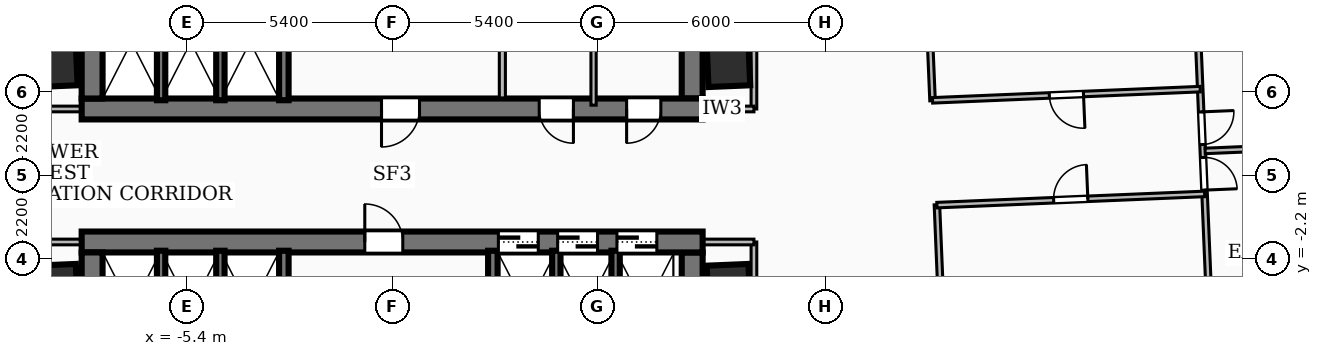
"""IFC4 building model, lengths in metres.
Left out: names, types, materials, properties, quantities, classifications, styles, units other than length and angle.
Written with IfcOpenShell. Run it as: python <this file> out.ifc"""

import sys

from ifc_helpers import new_model, si_unit, direction, frame, frame_2d, origin, origin_2d, place, context, subcontext, project, spatial, rectangle, extrude, element, fill, save


model = new_model("IFC4")
c1 = context("Model", 3, precision=1e-05, world=origin(), true_north=direction((0.0, 1.0)))
c2 = subcontext(c1, "Body", "Model", "MODEL_VIEW")
j1 = project(units=[si_unit("LENGTHUNIT", "METRE"), si_unit("PLANEANGLEUNIT", "RADIAN")], contexts=[c1])
p1 = place(None, origin())
s1 = spatial("IfcSite", under=j1, at=p1, CompositionType="ELEMENT")
p2 = place(p1, origin())
s2 = spatial("IfcBuilding", under=s1, at=p2, CompositionType="ELEMENT")
p3 = place(p2, frame((0.0, 0.0, 46.08)))
s3 = spatial("IfcBuildingStorey", under=s2, at=p3, CompositionType="ELEMENT", Elevation=46.08)
p4 = place(p3, frame((8.17, 1.75, 0.0), z_axis=(0.0, 0.0, 1.0), x_axis=(-1.0, 0.0, 0.0)))
e1 = element("IfcWall", 1, at=p4, inside=s3, PredefinedType="SHEAR", context=c2, shape_type="SweptSolid", body=[
    extrude(rectangle(XDim=16.34, YDim=0.55, at=frame_2d((8.17, 0.0))), origin(), (0.0, 0.0, 1.0), 3.32),
])
p5 = place(p4, frame((7.45, 0.0, 0.0)))
e2 = element("IfcOpeningElement", 2, at=p5, cuts=e1, PredefinedType="OPENING", context=c2, shape_type="SweptSolid", body=[
    extrude(rectangle(XDim=1.0, YDim=2.1, at=frame_2d((0.5, 1.05))), frame((0.0, 0.285, 0.0), z_axis=(0.0, -1.0, 0.0), x_axis=(1.0, 0.0, 0.0)), (0.0, 0.0, 1.0), 0.57),
])
p6 = place(p4, frame((3.4, 0.0, 0.0)))
e3 = element("IfcOpeningElement", 3, at=p6, cuts=e1, PredefinedType="OPENING", context=c2, shape_type="SweptSolid", body=[
    extrude(rectangle(XDim=0.9, YDim=2.06, at=frame_2d((0.45, 1.03))), frame((0.0, 0.285, 0.0), z_axis=(0.0, -1.0, 0.0), x_axis=(1.0, 0.0, 0.0)), (0.0, 0.0, 1.0), 0.57),
])
p7 = place(p4, frame((1.1, 0.0, 0.0)))
e4 = element("IfcOpeningElement", 4, at=p7, cuts=e1, PredefinedType="OPENING", context=c2, shape_type="SweptSolid", body=[
    extrude(rectangle(XDim=0.9, YDim=2.06, at=frame_2d((0.45, 1.03))), frame((0.0, 0.285, 0.0), z_axis=(0.0, -1.0, 0.0), x_axis=(1.0, 0.0, 0.0)), (0.0, 0.0, 1.0), 0.57),
])
for number, where, z_axis, x_axis in (
    (5, (-7.895, 2.025, 0.0), (0.0, 0.0, 1.0), (0.0, 1.0, 0.0)),
    (6, (7.895, 8.31, 0.0), (0.0, 0.0, 1.0), (0.0, -1.0, 0.0)),
):
    element("IfcWall", number, at=place(p3, frame(where, z_axis=z_axis, x_axis=x_axis)), inside=s3, PredefinedType="SHEAR", context=c2, shape_type="SweptSolid", body=[
        extrude(rectangle(XDim=6.285, YDim=0.55, at=frame_2d((3.143, 0.0))), origin(), (0.0, 0.0, 1.0), 3.32),
    ])
p8 = place(p3, frame((-8.17, -1.75, 0.0), z_axis=(0.0, 0.0, 1.0), x_axis=(1.0, 0.0, 0.0)))
e7 = element("IfcWall", 7, at=p8, inside=s3, PredefinedType="SHEAR", context=c2, shape_type="SweptSolid", body=[
    extrude(rectangle(XDim=16.34, YDim=0.55, at=frame_2d((8.17, 0.0))), origin(), (0.0, 0.0, 1.0), 3.32),
])
p9 = place(p8, frame((7.45, 0.0, 0.0)))
e8 = element("IfcOpeningElement", 8, at=p9, cuts=e7, PredefinedType="OPENING", context=c2, shape_type="SweptSolid", body=[
    extrude(rectangle(XDim=1.0, YDim=2.1, at=frame_2d((0.5, 1.05))), frame((0.0, 0.285, 0.0), z_axis=(0.0, -1.0, 0.0), x_axis=(1.0, 0.0, 0.0)), (0.0, 0.0, 1.0), 0.57),
])
p10 = place(p8, frame((10.965, 0.0, 0.0)))
e9 = element("IfcOpeningElement", 9, at=p10, cuts=e7, PredefinedType="OPENING", context=c2, shape_type="SweptSolid", body=[
    extrude(rectangle(XDim=1.05, YDim=2.15, at=frame_2d((0.525, 1.075))), frame((0.0, 0.285, 0.0), z_axis=(0.0, -1.0, 0.0), x_axis=(1.0, 0.0, 0.0)), (0.0, 0.0, 1.0), 0.57),
])
p11 = place(p8, frame((12.525, 0.0, 0.0)))
e10 = element("IfcOpeningElement", 10, at=p11, cuts=e7, PredefinedType="OPENING", context=c2, shape_type="SweptSolid", body=[
    extrude(rectangle(XDim=1.05, YDim=2.15, at=frame_2d((0.525, 1.075))), frame((0.0, 0.285, 0.0), z_axis=(0.0, -1.0, 0.0), x_axis=(1.0, 0.0, 0.0)), (0.0, 0.0, 1.0), 0.57),
])
p12 = place(p8, frame((14.085, 0.0, 0.0)))
e11 = element("IfcOpeningElement", 11, at=p12, cuts=e7, PredefinedType="OPENING", context=c2, shape_type="SweptSolid", body=[
    extrude(rectangle(XDim=1.05, YDim=2.15, at=frame_2d((0.525, 1.075))), frame((0.0, 0.285, 0.0), z_axis=(0.0, -1.0, 0.0), x_axis=(1.0, 0.0, 0.0)), (0.0, 0.0, 1.0), 0.57),
])
for number, where, z_axis, x_axis in (
    (12, (-7.895, -8.31, 0.0), (0.0, 0.0, 1.0), (0.0, 1.0, 0.0)),
    (13, (7.895, -2.025, 0.0), (0.0, 0.0, 1.0), (0.0, -1.0, 0.0)),
):
    element("IfcWall", number, at=place(p3, frame(where, z_axis=z_axis, x_axis=x_axis)), inside=s3, PredefinedType="SHEAR", context=c2, shape_type="SweptSolid", body=[
        extrude(rectangle(XDim=6.285, YDim=0.55, at=frame_2d((3.143, 0.0))), origin(), (0.0, 0.0, 1.0), 3.32),
    ])
for number, where, z_axis, x_axis in (
    (14, (-2.85, 1.98, 0.0), (0.0, 0.0, 1.0), (0.0, 1.0, 0.0)),
    (15, (-2.85, -5.05, 0.0), (0.0, 0.0, 1.0), (0.0, 1.0, 0.0)),
    (16, (2.65, -5.05, 0.0), (0.0, 0.0, 1.0), (0.0, 1.0, 0.0)),
):
    element("IfcWall", number, at=place(p3, frame(where, z_axis=z_axis, x_axis=x_axis)), inside=s3, PredefinedType="SOLIDWALL", context=c2, shape_type="SweptSolid", body=[
        extrude(rectangle(XDim=3.07, YDim=0.25, at=frame_2d((1.535, 0.0))), origin(), (0.0, 0.0, 1.0), 3.32),
    ])
for number, where, z_axis, x_axis in (
    (17, (-6.08, 1.98, 0.0), (0.0, 0.0, 1.0), (0.0, 1.0, 0.0)),
    (18, (-4.52, 1.98, 0.0), (0.0, 0.0, 1.0), (0.0, 1.0, 0.0)),
    (19, (4.32, -5.05, 0.0), (0.0, 0.0, 1.0), (0.0, 1.0, 0.0)),
    (20, (5.88, -5.05, 0.0), (0.0, 0.0, 1.0), (0.0, 1.0, 0.0)),
    (21, (-6.08, -5.05, 0.0), (0.0, 0.0, 1.0), (0.0, 1.0, 0.0)),
    (22, (-4.52, -5.05, 0.0), (0.0, 0.0, 1.0), (0.0, 1.0, 0.0)),
):
    element("IfcWall", number, at=place(p3, frame(where, z_axis=z_axis, x_axis=x_axis)), inside=s3, PredefinedType="SOLIDWALL", context=c2, shape_type="SweptSolid", body=[
        extrude(rectangle(XDim=3.07, YDim=0.22, at=frame_2d((1.535, 0.0))), origin(), (0.0, 0.0, 1.0), 3.32),
    ])
for number, where, z_axis, x_axis in (
    (23, (-8.85, -2.9, 0.0), (0.0, 0.0, 1.0), (0.999, 0.042, 0.0)),
    (24, (-8.85, 2.9, 0.0), (0.0, 0.0, 1.0), (0.999, 0.042, 0.0)),
    (25, (8.85, -2.9, 0.0), (0.0, 0.0, 1.0), (0.999, 0.042, 0.0)),
    (26, (8.85, 2.9, 0.0), (0.0, 0.0, 1.0), (0.999, 0.042, 0.0)),
):
    element("IfcColumn", number, at=place(p3, frame(where, z_axis=z_axis, x_axis=x_axis)), inside=s3, PredefinedType="COLUMN", context=c2, shape_type="SweptSolid", body=[
        extrude(rectangle(XDim=1.1, YDim=1.1, at=origin_2d()), origin(), (0.0, 0.0, 1.0), 3.6),
    ])
p13 = place(p3, frame((2.9, 2.04, 0.0), z_axis=(0.0, 0.0, 1.0), x_axis=(0.0, 1.0, 0.0)))
e27 = element("IfcWall", 27, at=p13, inside=s3, PredefinedType="PARTITIONING", context=c2, shape_type="SweptSolid", body=[
    extrude(rectangle(XDim=2.94, YDim=0.16, at=frame_2d((1.47, 0.0))), origin(), (0.0, 0.0, 1.0), 2.385),
])
p14 = place(p13, frame((1.82, 0.0, 0.0)))
e28 = element("IfcOpeningElement", 28, at=p14, cuts=e27, PredefinedType="OPENING", context=c2, shape_type="SweptSolid", body=[
    extrude(rectangle(XDim=0.9, YDim=2.06, at=frame_2d((0.45, 1.03))), frame((0.0, 0.09, 0.0), z_axis=(0.0, -1.0, 0.0), x_axis=(1.0, 0.0, 0.0)), (0.0, 0.0, 1.0), 0.18),
])
p15 = place(p3, frame((5.3, 1.85, 0.0), z_axis=(0.0, 0.0, 1.0), x_axis=(0.0, 1.0, 0.0)))
e29 = element("IfcWall", 29, at=p15, inside=s3, PredefinedType="PARTITIONING", context=c2, shape_type="SweptSolid", body=[
    extrude(rectangle(XDim=1.89, YDim=0.138, at=frame_2d((0.945, 0.0))), origin(), (0.0, 0.0, 1.0), 2.385),
])
for number, where, z_axis, x_axis in (
    (30, (-7.85, 1.75, 0.0), (0.0, 0.0, 1.0), (-1.0, 0.0, 0.0)),
    (31, (-7.85, -1.75, 0.0), (0.0, 0.0, 1.0), (-1.0, 0.0, 0.0)),
):
    element("IfcWall", number, at=place(p3, frame(where, z_axis=z_axis, x_axis=x_axis)), inside=s3, PredefinedType="PARTITIONING", context=c2, shape_type="SweptSolid", body=[
        extrude(rectangle(XDim=1.67, YDim=0.15, at=frame_2d((0.835, 0.0))), origin(), (0.0, 0.0, 1.0), 2.385),
    ])
p16 = place(p3, frame((9.52, 1.75, 0.0), z_axis=(0.0, 0.0, 1.0), x_axis=(0.0, 1.0, 0.0)))
e32 = element("IfcWall", 32, at=p16, inside=s3, PredefinedType="PARTITIONING", context=c2, shape_type="SweptSolid", body=[
    extrude(rectangle(XDim=6.63, YDim=0.15, at=frame_2d((3.315, 0.0))), origin(), (0.0, 0.0, 1.0), 2.401),
])
p17 = place(p3, frame((7.85, 1.75, 0.0), z_axis=(0.0, 0.0, 1.0), x_axis=(1.0, 0.0, 0.0)))
e33 = element("IfcWall", 33, at=p17, inside=s3, PredefinedType="PARTITIONING", context=c2, shape_type="SweptSolid", body=[
    extrude(rectangle(XDim=1.67, YDim=0.15, at=frame_2d((0.835, 0.0))), origin(), (0.0, 0.0, 1.0), 2.385),
])
p18 = place(p3, frame((9.52, -8.38, 0.0), z_axis=(0.0, 0.0, 1.0), x_axis=(0.0, 1.0, 0.0)))
e34 = element("IfcWall", 34, at=p18, inside=s3, PredefinedType="PARTITIONING", context=c2, shape_type="SweptSolid", body=[
    extrude(rectangle(XDim=6.63, YDim=0.15, at=frame_2d((3.315, 0.0))), origin(), (0.0, 0.0, 1.0), 2.401),
])
p19 = place(p3, frame((7.85, -1.75, 0.0), z_axis=(0.0, 0.0, 1.0), x_axis=(1.0, 0.0, 0.0)))
e35 = element("IfcWall", 35, at=p19, inside=s3, PredefinedType="PARTITIONING", context=c2, shape_type="SweptSolid", body=[
    extrude(rectangle(XDim=1.67, YDim=0.15, at=frame_2d((0.835, 0.0))), origin(), (0.0, 0.0, 1.0), 2.385),
])
p20 = place(p3, frame((14.22, 1.967, 0.0), z_axis=(0.0, 0.0, 1.0), x_axis=(-0.041948565382, 0.99911977153, 0.0)))
e36 = element("IfcWall", 36, at=p20, inside=s3, PredefinedType="PARTITIONING", context=c2, shape_type="SweptSolid", body=[
    extrude(rectangle(XDim=8.27, YDim=0.145, at=frame_2d((4.135, 0.0))), origin(), (0.0, 0.0, 1.0), 2.401),
])
p21 = place(p3, frame((14.668, -8.714, 0.0), z_axis=(0.0, 0.0, 1.0), x_axis=(-0.041882146625, 0.999122557945, 0.0)))
e37 = element("IfcWall", 37, at=p21, inside=s3, PredefinedType="PARTITIONING", context=c2, shape_type="SweptSolid", body=[
    extrude(rectangle(XDim=7.951, YDim=0.145, at=frame_2d((3.976, 0.0))), origin(), (0.0, 0.0, 1.0), 2.401),
])
p22 = place(p3, frame((21.263, 2.272, 0.0), z_axis=(0.0, 0.0, 1.0), x_axis=(-0.999124408039, -0.041837988246, 0.0)))
e38 = element("IfcWall", 38, at=p22, inside=s3, PredefinedType="PARTITIONING", context=c2, shape_type="SweptSolid", body=[
    extrude(rectangle(XDim=7.049, YDim=0.145, at=frame_2d((3.524, 0.0))), origin(), (0.0, 0.0, 1.0), 3.32),
])
p23 = place(p22, frame((3.074, 0.0, 0.0)))
e39 = element("IfcOpeningElement", 39, at=p23, cuts=e38, PredefinedType="OPENING", context=c2, shape_type="SweptSolid", body=[
    extrude(rectangle(XDim=0.9, YDim=2.06, at=frame_2d((0.45, 1.03))), frame((0.0, 0.083, 0.0), z_axis=(0.0, -1.0, 0.0), x_axis=(1.0, 0.0, 0.0)), (0.0, 0.0, 1.0), 0.165),
])
p24 = place(p3, frame((14.335, -0.78, 0.0), z_axis=(0.0, 0.0, 1.0), x_axis=(0.999124650485, 0.041832198038, 0.0)))
e40 = element("IfcWall", 40, at=p24, inside=s3, PredefinedType="PARTITIONING", context=c2, shape_type="SweptSolid", body=[
    extrude(rectangle(XDim=7.05, YDim=0.145, at=frame_2d((3.525, 0.0))), origin(), (0.0, 0.0, 1.0), 3.32),
])
p25 = place(p24, frame((3.075, 0.0, 0.0)))
e41 = element("IfcOpeningElement", 41, at=p25, cuts=e40, PredefinedType="OPENING", context=c2, shape_type="SweptSolid", body=[
    extrude(rectangle(XDim=0.9, YDim=2.06, at=frame_2d((0.45, 1.03))), frame((0.0, 0.083, 0.0), z_axis=(0.0, -1.0, 0.0), x_axis=(1.0, 0.0, 0.0)), (0.0, 0.0, 1.0), 0.165),
])
p26 = place(p3, frame((21.392, 0.646, 0.0), z_axis=(0.0, 0.0, 1.0), x_axis=(0.999122039379, 0.041894515479, 0.0)))
e42 = element("IfcWall", 42, at=p26, inside=s3, PredefinedType="PARTITIONING", context=c2, shape_type="SweptSolid", body=[
    extrude(rectangle(XDim=11.195, YDim=0.145, at=frame_2d((5.597, 0.0))), origin(), (0.0, 0.0, 1.0), 2.812),
])
p27 = place(p3, frame((21.062, 7.083, 0.0), z_axis=(0.0, 0.0, 1.0), x_axis=(0.041855051962, -0.999123693356, 0.0)))
e43 = element("IfcWall", 43, at=p27, inside=s3, PredefinedType="PARTITIONING", context=c2, shape_type="SweptSolid", body=[
    extrude(rectangle(XDim=12.71, YDim=0.145, at=frame_2d((6.355, 0.0))), origin(), (0.0, 0.0, 1.0), 2.401),
])
p28 = place(p27, frame((6.615, 0.0, 0.0)))
e44 = element("IfcOpeningElement", 44, at=p28, cuts=e43, PredefinedType="OPENING", context=c2, shape_type="SweptSolid", body=[
    extrude(rectangle(XDim=0.86, YDim=2.04, at=frame_2d((0.43, 1.02))), frame((0.0, 0.083, 0.0), z_axis=(0.0, -1.0, 0.0), x_axis=(1.0, 0.0, 0.0)), (0.0, 0.0, 1.0), 0.165),
])
p29 = place(p27, frame((5.415, 0.0, 0.0)))
e45 = element("IfcOpeningElement", 45, at=p29, cuts=e43, PredefinedType="OPENING", context=c2, shape_type="SweptSolid", body=[
    extrude(rectangle(XDim=0.86, YDim=2.04, at=frame_2d((0.43, 1.02))), frame((0.0, 0.083, 0.0), z_axis=(0.0, -1.0, 0.0), x_axis=(1.0, 0.0, 0.0)), (0.0, 0.0, 1.0), 0.165),
])
p30 = place(p5, origin())
e46 = element("IfcDoor", 46, at=p30, inside=s3, OperationType="SINGLE_SWING_RIGHT", PredefinedType="DOOR", context=c2, shape_type="SweptSolid", body=[
    extrude(rectangle(XDim=1.0, YDim=2.1, at=frame_2d((0.5, 1.05))), frame((0.0, 0.025, 0.0), z_axis=(0.0, -1.0, 0.0), x_axis=(1.0, 0.0, 0.0)), (0.0, 0.0, 1.0), 0.05),
])
fill(e2, e46)
p31 = place(p9, origin())
e47 = element("IfcDoor", 47, at=p31, inside=s3, OperationType="SINGLE_SWING_LEFT", PredefinedType="DOOR", context=c2, shape_type="SweptSolid", body=[
    extrude(rectangle(XDim=1.0, YDim=2.1, at=frame_2d((0.5, 1.05))), frame((0.0, 0.025, 0.0), z_axis=(0.0, -1.0, 0.0), x_axis=(1.0, 0.0, 0.0)), (0.0, 0.0, 1.0), 0.05),
])
fill(e8, e47)
p32 = place(p10, origin())
e48 = element("IfcDoor", 48, at=p32, inside=s3, OperationType="DOUBLE_DOOR_SLIDING", PredefinedType="DOOR", context=c2, shape_type="SweptSolid", body=[
    extrude(rectangle(XDim=1.05, YDim=2.15, at=frame_2d((0.525, 1.075))), frame((0.0, 0.025, 0.0), z_axis=(0.0, -1.0, 0.0), x_axis=(1.0, 0.0, 0.0)), (0.0, 0.0, 1.0), 0.05),
])
fill(e9, e48)
p33 = place(p11, origin())
e49 = element("IfcDoor", 49, at=p33, inside=s3, OperationType="DOUBLE_DOOR_SLIDING", PredefinedType="DOOR", context=c2, shape_type="SweptSolid", body=[
    extrude(rectangle(XDim=1.05, YDim=2.15, at=frame_2d((0.525, 1.075))), frame((0.0, 0.025, 0.0), z_axis=(0.0, -1.0, 0.0), x_axis=(1.0, 0.0, 0.0)), (0.0, 0.0, 1.0), 0.05),
])
fill(e10, e49)
p34 = place(p12, origin())
e50 = element("IfcDoor", 50, at=p34, inside=s3, OperationType="DOUBLE_DOOR_SLIDING", PredefinedType="DOOR", context=c2, shape_type="SweptSolid", body=[
    extrude(rectangle(XDim=1.05, YDim=2.15, at=frame_2d((0.525, 1.075))), frame((0.0, 0.025, 0.0), z_axis=(0.0, -1.0, 0.0), x_axis=(1.0, 0.0, 0.0)), (0.0, 0.0, 1.0), 0.05),
])
fill(e11, e50)
p35 = place(p6, origin())
e51 = element("IfcDoor", 51, at=p35, inside=s3, OperationType="SINGLE_SWING_LEFT", PredefinedType="DOOR", context=c2, shape_type="SweptSolid", body=[
    extrude(rectangle(XDim=0.9, YDim=2.06, at=frame_2d((0.45, 1.03))), frame((0.0, 0.025, 0.0), z_axis=(0.0, -1.0, 0.0), x_axis=(1.0, 0.0, 0.0)), (0.0, 0.0, 1.0), 0.05),
])
fill(e3, e51)
p36 = place(p7, origin())
e52 = element("IfcDoor", 52, at=p36, inside=s3, OperationType="SINGLE_SWING_RIGHT", PredefinedType="DOOR", context=c2, shape_type="SweptSolid", body=[
    extrude(rectangle(XDim=0.9, YDim=2.06, at=frame_2d((0.45, 1.03))), frame((0.0, 0.025, 0.0), z_axis=(0.0, -1.0, 0.0), x_axis=(1.0, 0.0, 0.0)), (0.0, 0.0, 1.0), 0.05),
])
fill(e4, e52)
p37 = place(p23, origin())
e53 = element("IfcDoor", 53, at=p37, inside=s3, OperationType="SINGLE_SWING_LEFT", PredefinedType="DOOR", context=c2, shape_type="SweptSolid", body=[
    extrude(rectangle(XDim=0.9, YDim=2.06, at=frame_2d((0.45, 1.03))), frame((0.0, 0.025, 0.0), z_axis=(0.0, -1.0, 0.0), x_axis=(1.0, 0.0, 0.0)), (0.0, 0.0, 1.0), 0.05),
])
fill(e39, e53)
p38 = place(p25, origin())
e54 = element("IfcDoor", 54, at=p38, inside=s3, OperationType="SINGLE_SWING_RIGHT", PredefinedType="DOOR", context=c2, shape_type="SweptSolid", body=[
    extrude(rectangle(XDim=0.9, YDim=2.06, at=frame_2d((0.45, 1.03))), frame((0.0, 0.025, 0.0), z_axis=(0.0, -1.0, 0.0), x_axis=(1.0, 0.0, 0.0)), (0.0, 0.0, 1.0), 0.05),
])
fill(e41, e54)
p39 = place(p28, origin())
e55 = element("IfcDoor", 55, at=p39, inside=s3, OperationType="SINGLE_SWING_RIGHT", PredefinedType="DOOR", context=c2, shape_type="SweptSolid", body=[
    extrude(rectangle(XDim=0.86, YDim=2.04, at=frame_2d((0.43, 1.02))), frame((0.0, 0.025, 0.0), z_axis=(0.0, -1.0, 0.0), x_axis=(1.0, 0.0, 0.0)), (0.0, 0.0, 1.0), 0.05),
])
fill(e44, e55)
p40 = place(p29, origin())
e56 = element("IfcDoor", 56, at=p40, inside=s3, OperationType="SINGLE_SWING_LEFT", PredefinedType="DOOR", context=c2, shape_type="SweptSolid", body=[
    extrude(rectangle(XDim=0.86, YDim=2.04, at=frame_2d((0.43, 1.02))), frame((0.0, 0.025, 0.0), z_axis=(0.0, -1.0, 0.0), x_axis=(1.0, 0.0, 0.0)), (0.0, 0.0, 1.0), 0.05),
])
fill(e45, e56)
save(model, sys.argv[1])
